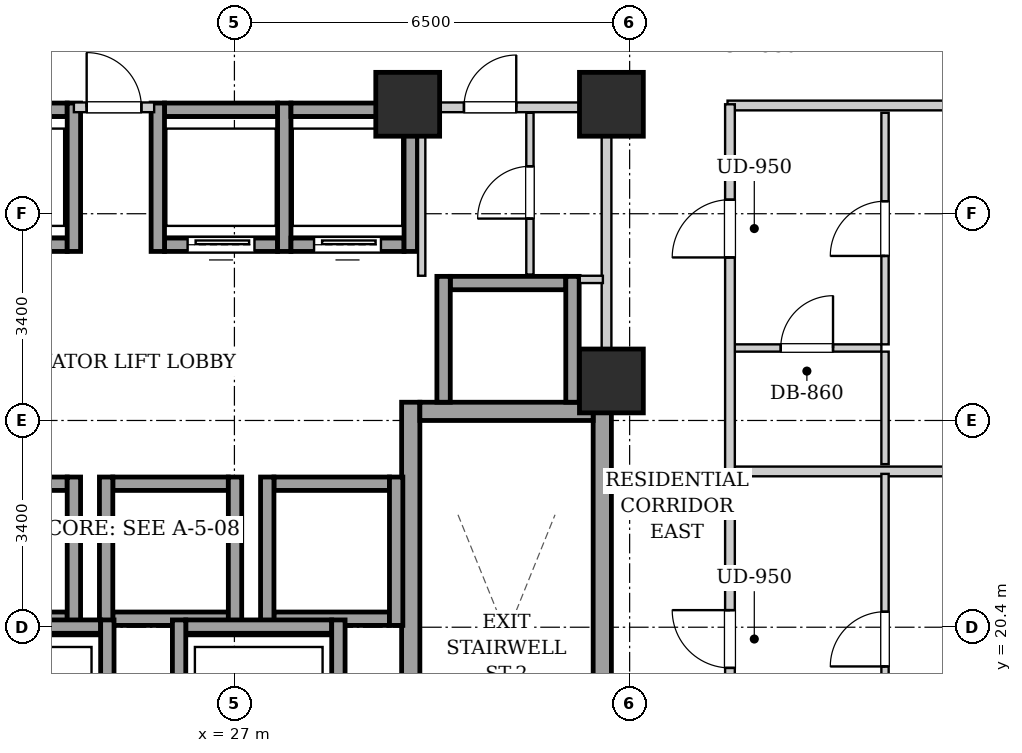
"""IFC4 building model, lengths in metres.
Left out: names, types, materials, properties, quantities, classifications, styles, units other than length and angle.
Written with IfcOpenShell. Run it as: python <this file> out.ifc"""

import sys

from ifc_helpers import new_model, si_unit, direction, frame, frame_2d, origin, origin_2d, place, context, subcontext, project, spatial, rectangle, extrude, element, fill, save


model = new_model("IFC4")
c1 = context("Model", 3, precision=1e-05, world=origin(), true_north=direction((0.0, 1.0)))
c2 = subcontext(c1, "Body", "Model", "MODEL_VIEW")
j1 = project(units=[si_unit("LENGTHUNIT", "METRE"), si_unit("PLANEANGLEUNIT", "RADIAN")], contexts=[c1])
p1 = place(None, origin())
s1 = spatial("IfcSite", under=j1, at=p1, CompositionType="ELEMENT")
p2 = place(p1, origin())
s2 = spatial("IfcBuilding", under=s1, at=p2, CompositionType="ELEMENT")
p3 = place(p2, frame((0.0, 0.0, 113.5)))
s3 = spatial("IfcBuildingStorey", under=s2, at=p3, CompositionType="ELEMENT", Elevation=113.5)
for number, where, z_axis, x_axis in (
    (1, (29.85, 29.0, 0.0), (0.0, 0.0, 1.0), (1.0, 0.0, 0.0)),
    (2, (33.2, 29.0, 0.0), (0.0, 0.0, 1.0), (1.0, 0.0, 0.0)),
    (3, (33.2, 24.45, 0.0), (0.0, 0.0, 1.0), (1.0, 0.0, 0.0)),
):
    element("IfcColumn", number, at=place(p3, frame(where, z_axis=z_axis, x_axis=x_axis)), inside=s3, PredefinedType="COLUMN", context=c2, shape_type="SweptSolid", body=[
        extrude(rectangle(XDim=1.05, YDim=1.05, at=origin_2d()), origin(), (0.0, 0.0, 1.0), 3.2),
    ])
for number, where, z_axis, x_axis in (
    (4, (29.9, 15.1, 0.0), (0.0, 0.0, 1.0), (0.0, 1.0, 0.0)),
    (5, (33.05, 15.1, 0.0), (0.0, 0.0, 1.0), (0.0, 1.0, 0.0)),
):
    element("IfcWall", number, at=place(p3, frame(where, z_axis=z_axis, x_axis=x_axis)), inside=s3, PredefinedType="SHEAR", context=c2, shape_type="SweptSolid", body=[
        extrude(rectangle(XDim=9.0, YDim=0.3, at=frame_2d((4.5, 0.0))), origin(), (0.0, 0.0, 1.0), 2.94),
    ])
p4 = place(p3, frame((30.05, 23.95, 0.0), z_axis=(0.0, 0.0, 1.0), x_axis=(1.0, 0.0, 0.0)))
e6 = element("IfcWall", 6, at=p4, inside=s3, PredefinedType="SHEAR", context=c2, shape_type="SweptSolid", body=[
    extrude(rectangle(XDim=2.85, YDim=0.3, at=frame_2d((1.425, 0.0))), origin(), (0.0, 0.0, 1.0), 2.94),
])
p5 = place(p3, frame((22.35, 26.69, 0.0), z_axis=(0.0, 0.0, 1.0), x_axis=(1.0, 0.0, 0.0)))
e7 = element("IfcWall", 7, at=p5, inside=s3, PredefinedType="SHEAR", context=c2, shape_type="SweptSolid", body=[
    extrude(rectangle(XDim=1.9, YDim=0.22, at=frame_2d((0.95, 0.0))), origin(), (0.0, 0.0, 1.0), 2.94),
])
p6 = place(p5, frame((0.4, 0.0, 0.0)))
e8 = element("IfcOpeningElement", 8, at=p6, cuts=e7, PredefinedType="OPENING", context=c2, shape_type="SweptSolid", body=[
    extrude(rectangle(XDim=1.1, YDim=2.15, at=frame_2d((0.55, 1.075))), frame((0.0, 0.12, 0.0), z_axis=(0.0, -1.0, 0.0), x_axis=(1.0, 0.0, 0.0)), (0.0, 0.0, 1.0), 0.24),
])
p7 = place(p3, frame((22.35, 28.91, 0.0), z_axis=(0.0, 0.0, 1.0), x_axis=(1.0, 0.0, 0.0)))
e9 = element("IfcWall", 9, at=p7, inside=s3, PredefinedType="SHEAR", context=c2, shape_type="SweptSolid", body=[
    extrude(rectangle(XDim=1.9, YDim=0.22, at=frame_2d((0.95, 0.0))), origin(), (0.0, 0.0, 1.0), 2.94),
])
p8 = place(p3, frame((24.36, 26.58, 0.0), z_axis=(0.0, 0.0, 1.0), x_axis=(0.0, 1.0, 0.0)))
e10 = element("IfcWall", 10, at=p8, inside=s3, PredefinedType="SHEAR", context=c2, shape_type="SweptSolid", body=[
    extrude(rectangle(XDim=2.44, YDim=0.22, at=frame_2d((1.22, 0.0))), origin(), (0.0, 0.0, 1.0), 2.94),
])
p9 = place(p3, frame((25.85, 26.69, 0.0), z_axis=(0.0, 0.0, 1.0), x_axis=(1.0, 0.0, 0.0)))
e11 = element("IfcWall", 11, at=p9, inside=s3, PredefinedType="SHEAR", context=c2, shape_type="SweptSolid", body=[
    extrude(rectangle(XDim=1.86, YDim=0.22, at=frame_2d((0.93, 0.0))), origin(), (0.0, 0.0, 1.0), 2.94),
])
p10 = place(p9, frame((0.38, 0.0, 0.0)))
e12 = element("IfcOpeningElement", 12, at=p10, cuts=e11, PredefinedType="OPENING", context=c2, shape_type="SweptSolid", body=[
    extrude(rectangle(XDim=1.1, YDim=2.15, at=frame_2d((0.55, 1.075))), frame((0.0, 0.12, 0.0), z_axis=(0.0, -1.0, 0.0), x_axis=(1.0, 0.0, 0.0)), (0.0, 0.0, 1.0), 0.24),
])
p11 = place(p3, frame((25.85, 28.91, 0.0), z_axis=(0.0, 0.0, 1.0), x_axis=(1.0, 0.0, 0.0)))
e13 = element("IfcWall", 13, at=p11, inside=s3, PredefinedType="SHEAR", context=c2, shape_type="SweptSolid", body=[
    extrude(rectangle(XDim=1.86, YDim=0.22, at=frame_2d((0.93, 0.0))), origin(), (0.0, 0.0, 1.0), 2.94),
])
for number, where, z_axis, x_axis in (
    (14, (25.74, 26.58, 0.0), (0.0, 0.0, 1.0), (0.0, 1.0, 0.0)),
    (15, (27.82, 26.58, 0.0), (0.0, 0.0, 1.0), (0.0, 1.0, 0.0)),
):
    element("IfcWall", number, at=place(p3, frame(where, z_axis=z_axis, x_axis=x_axis)), inside=s3, PredefinedType="SHEAR", context=c2, shape_type="SweptSolid", body=[
        extrude(rectangle(XDim=2.44, YDim=0.22, at=frame_2d((1.22, 0.0))), origin(), (0.0, 0.0, 1.0), 2.94),
    ])
p12 = place(p3, frame((27.93, 26.69, 0.0), z_axis=(0.0, 0.0, 1.0), x_axis=(1.0, 0.0, 0.0)))
e16 = element("IfcWall", 16, at=p12, inside=s3, PredefinedType="SHEAR", context=c2, shape_type="SweptSolid", body=[
    extrude(rectangle(XDim=1.86, YDim=0.22, at=frame_2d((0.93, 0.0))), origin(), (0.0, 0.0, 1.0), 2.94),
])
p13 = place(p12, frame((0.38, 0.0, 0.0)))
e17 = element("IfcOpeningElement", 17, at=p13, cuts=e16, PredefinedType="OPENING", context=c2, shape_type="SweptSolid", body=[
    extrude(rectangle(XDim=1.1, YDim=2.15, at=frame_2d((0.55, 1.075))), frame((0.0, 0.12, 0.0), z_axis=(0.0, -1.0, 0.0), x_axis=(1.0, 0.0, 0.0)), (0.0, 0.0, 1.0), 0.24),
])
p14 = place(p3, frame((27.93, 28.91, 0.0), z_axis=(0.0, 0.0, 1.0), x_axis=(1.0, 0.0, 0.0)))
e18 = element("IfcWall", 18, at=p14, inside=s3, PredefinedType="SHEAR", context=c2, shape_type="SweptSolid", body=[
    extrude(rectangle(XDim=1.86, YDim=0.22, at=frame_2d((0.93, 0.0))), origin(), (0.0, 0.0, 1.0), 2.94),
])
p15 = place(p3, frame((29.9, 26.58, 0.0), z_axis=(0.0, 0.0, 1.0), x_axis=(0.0, 1.0, 0.0)))
e19 = element("IfcWall", 19, at=p15, inside=s3, PredefinedType="SHEAR", context=c2, shape_type="SweptSolid", body=[
    extrude(rectangle(XDim=2.44, YDim=0.22, at=frame_2d((1.22, 0.0))), origin(), (0.0, 0.0, 1.0), 2.94),
])
for number, where, z_axis, x_axis in (
    (20, (22.35, 20.54, 0.0), (0.0, 0.0, 1.0), (1.0, 0.0, 0.0)),
    (21, (22.35, 22.76, 0.0), (0.0, 0.0, 1.0), (1.0, 0.0, 0.0)),
):
    element("IfcWall", number, at=place(p3, frame(where, z_axis=z_axis, x_axis=x_axis)), inside=s3, PredefinedType="SHEAR", context=c2, shape_type="SweptSolid", body=[
        extrude(rectangle(XDim=1.9, YDim=0.22, at=frame_2d((0.95, 0.0))), origin(), (0.0, 0.0, 1.0), 2.94),
    ])
p16 = place(p3, frame((24.36, 20.43, 0.0), z_axis=(0.0, 0.0, 1.0), x_axis=(0.0, 1.0, 0.0)))
e22 = element("IfcWall", 22, at=p16, inside=s3, PredefinedType="SHEAR", context=c2, shape_type="SweptSolid", body=[
    extrude(rectangle(XDim=2.44, YDim=0.22, at=frame_2d((1.22, 0.0))), origin(), (0.0, 0.0, 1.0), 2.94),
])
for number, where, z_axis, x_axis in (
    (23, (25.0, 20.54, 0.0), (0.0, 0.0, 1.0), (1.0, 0.0, 0.0)),
    (24, (25.0, 22.76, 0.0), (0.0, 0.0, 1.0), (1.0, 0.0, 0.0)),
):
    element("IfcWall", number, at=place(p3, frame(where, z_axis=z_axis, x_axis=x_axis)), inside=s3, PredefinedType="SHEAR", context=c2, shape_type="SweptSolid", body=[
        extrude(rectangle(XDim=1.9, YDim=0.22, at=frame_2d((0.95, 0.0))), origin(), (0.0, 0.0, 1.0), 2.94),
    ])
for number, where, z_axis, x_axis in (
    (25, (24.89, 20.43, 0.0), (0.0, 0.0, 1.0), (0.0, 1.0, 0.0)),
    (26, (27.01, 20.43, 0.0), (0.0, 0.0, 1.0), (0.0, 1.0, 0.0)),
):
    element("IfcWall", number, at=place(p3, frame(where, z_axis=z_axis, x_axis=x_axis)), inside=s3, PredefinedType="SHEAR", context=c2, shape_type="SweptSolid", body=[
        extrude(rectangle(XDim=2.44, YDim=0.22, at=frame_2d((1.22, 0.0))), origin(), (0.0, 0.0, 1.0), 2.94),
    ])
for number, where, z_axis, x_axis in (
    (27, (27.65, 20.54, 0.0), (0.0, 0.0, 1.0), (1.0, 0.0, 0.0)),
    (28, (27.65, 22.76, 0.0), (0.0, 0.0, 1.0), (1.0, 0.0, 0.0)),
):
    element("IfcWall", number, at=place(p3, frame(where, z_axis=z_axis, x_axis=x_axis)), inside=s3, PredefinedType="SHEAR", context=c2, shape_type="SweptSolid", body=[
        extrude(rectangle(XDim=1.9, YDim=0.22, at=frame_2d((0.95, 0.0))), origin(), (0.0, 0.0, 1.0), 2.94),
    ])
for number, where, z_axis, x_axis in (
    (29, (27.54, 20.43, 0.0), (0.0, 0.0, 1.0), (0.0, 1.0, 0.0)),
    (30, (29.66, 20.43, 0.0), (0.0, 0.0, 1.0), (0.0, 1.0, 0.0)),
):
    element("IfcWall", number, at=place(p3, frame(where, z_axis=z_axis, x_axis=x_axis)), inside=s3, PredefinedType="SHEAR", context=c2, shape_type="SweptSolid", body=[
        extrude(rectangle(XDim=2.44, YDim=0.22, at=frame_2d((1.22, 0.0))), origin(), (0.0, 0.0, 1.0), 2.94),
    ])
p17 = place(p3, frame((30.55, 26.06, 0.0), z_axis=(0.0, 0.0, 1.0), x_axis=(1.0, 0.0, 0.0)))
e31 = element("IfcWall", 31, at=p17, inside=s3, PredefinedType="SHEAR", context=c2, shape_type="SweptSolid", body=[
    extrude(rectangle(XDim=1.9, YDim=0.22, at=frame_2d((0.95, 0.0))), origin(), (0.0, 0.0, 1.0), 2.94),
])
for number, where, z_axis, x_axis in (
    (32, (30.44, 24.1, 0.0), (0.0, 0.0, 1.0), (0.0, 1.0, 0.0)),
    (33, (32.56, 24.1, 0.0), (0.0, 0.0, 1.0), (0.0, 1.0, 0.0)),
):
    element("IfcWall", number, at=place(p3, frame(where, z_axis=z_axis, x_axis=x_axis)), inside=s3, PredefinedType="SHEAR", context=c2, shape_type="SweptSolid", body=[
        extrude(rectangle(XDim=2.07, YDim=0.22, at=frame_2d((1.035, 0.0))), origin(), (0.0, 0.0, 1.0), 2.94),
    ])
p18 = place(p3, frame((22.4, 20.41, 0.0), z_axis=(0.0, 0.0, 1.0), x_axis=(1.0, 0.0, 0.0)))
e34 = element("IfcWall", 34, at=p18, inside=s3, PredefinedType="SHEAR", context=c2, shape_type="SweptSolid", body=[
    extrude(rectangle(XDim=2.4, YDim=0.22, at=frame_2d((1.2, 0.0))), origin(), (0.0, 0.0, 1.0), 2.94),
])
p19 = place(p3, frame((24.91, 17.98, 0.0), z_axis=(0.0, 0.0, 1.0), x_axis=(0.0, 1.0, 0.0)))
e35 = element("IfcWall", 35, at=p19, inside=s3, PredefinedType="SHEAR", context=c2, shape_type="SweptSolid", body=[
    extrude(rectangle(XDim=2.54, YDim=0.22, at=frame_2d((1.27, 0.0))), origin(), (0.0, 0.0, 1.0), 2.94),
])
p20 = place(p3, frame((26.2, 20.41, 0.0), z_axis=(0.0, 0.0, 1.0), x_axis=(1.0, 0.0, 0.0)))
e36 = element("IfcWall", 36, at=p20, inside=s3, PredefinedType="SHEAR", context=c2, shape_type="SweptSolid", body=[
    extrude(rectangle(XDim=2.4, YDim=0.22, at=frame_2d((1.2, 0.0))), origin(), (0.0, 0.0, 1.0), 2.94),
])
for number, where, z_axis, x_axis in (
    (37, (26.09, 17.98, 0.0), (0.0, 0.0, 1.0), (0.0, 1.0, 0.0)),
    (38, (28.71, 17.98, 0.0), (0.0, 0.0, 1.0), (0.0, 1.0, 0.0)),
):
    element("IfcWall", number, at=place(p3, frame(where, z_axis=z_axis, x_axis=x_axis)), inside=s3, PredefinedType="SHEAR", context=c2, shape_type="SweptSolid", body=[
        extrude(rectangle(XDim=2.54, YDim=0.22, at=frame_2d((1.27, 0.0))), origin(), (0.0, 0.0, 1.0), 2.94),
    ])
p21 = place(p3, frame((33.12, 24.12, 0.0), z_axis=(0.0, 0.0, 1.0), x_axis=(0.0, 1.0, 0.0)))
e39 = element("IfcWall", 39, at=p21, inside=s3, PredefinedType="PARTITIONING", context=c2, shape_type="SweptSolid", body=[
    extrude(rectangle(XDim=4.76, YDim=0.16, at=frame_2d((2.38, 0.0))), origin(), (0.0, 0.0, 1.0), 2.94),
])
p22 = place(p3, frame((24.36, 28.95, 0.0), z_axis=(0.0, 0.0, 1.0), x_axis=(1.0, 0.0, 0.0)))
e40 = element("IfcWall", 40, at=p22, inside=s3, PredefinedType="PARTITIONING", context=c2, shape_type="SweptSolid", body=[
    extrude(rectangle(XDim=1.32, YDim=0.16, at=frame_2d((0.66, 0.0))), origin(), (0.0, 0.0, 1.0), 2.313),
])
p23 = place(p22, frame((0.21, 0.0, 0.0)))
e41 = element("IfcOpeningElement", 41, at=p23, cuts=e40, PredefinedType="OPENING", context=c2, shape_type="SweptSolid", body=[
    extrude(rectangle(XDim=0.9, YDim=2.05, at=frame_2d((0.45, 1.025))), frame((0.0, 0.09, 0.0), z_axis=(0.0, -1.0, 0.0), x_axis=(1.0, 0.0, 0.0)), (0.0, 0.0, 1.0), 0.18),
])
p24 = place(p3, frame((30.08, 26.18, 0.0), z_axis=(0.0, 0.0, 1.0), x_axis=(0.0, 1.0, 0.0)))
e42 = element("IfcWall", 42, at=p24, inside=s3, PredefinedType="PARTITIONING", context=c2, shape_type="SweptSolid", body=[
    extrude(rectangle(XDim=2.68, YDim=0.12, at=frame_2d((1.34, 0.0))), origin(), (0.0, 0.0, 1.0), 2.94),
])
p25 = place(p3, frame((32.68, 26.12, 0.0), z_axis=(0.0, 0.0, 1.0), x_axis=(1.0, 0.0, 0.0)))
e43 = element("IfcWall", 43, at=p25, inside=s3, PredefinedType="PARTITIONING", context=c2, shape_type="SweptSolid", body=[
    extrude(rectangle(XDim=0.38, YDim=0.12, at=frame_2d((0.19, 0.0))), origin(), (0.0, 0.0, 1.0), 2.94),
])
p26 = place(p3, frame((31.86, 26.2, 0.0), z_axis=(0.0, 0.0, 1.0), x_axis=(0.0, 1.0, 0.0)))
e44 = element("IfcWall", 44, at=p26, inside=s3, PredefinedType="PARTITIONING", context=c2, shape_type="SweptSolid", body=[
    extrude(rectangle(XDim=2.66, YDim=0.12, at=frame_2d((1.33, 0.0))), origin(), (0.0, 0.0, 1.0), 2.94),
])
p27 = place(p26, frame((0.92, 0.0, 0.0)))
e45 = element("IfcOpeningElement", 45, at=p27, cuts=e44, PredefinedType="OPENING", context=c2, shape_type="SweptSolid", body=[
    extrude(rectangle(XDim=0.86, YDim=2.05, at=frame_2d((0.43, 1.025))), frame((0.0, 0.07, 0.0), z_axis=(0.0, -1.0, 0.0), x_axis=(1.0, 0.0, 0.0)), (0.0, 0.0, 1.0), 0.14),
])
p28 = place(p3, frame((30.08, 28.95, 0.0), z_axis=(0.0, 0.0, 1.0), x_axis=(1.0, 0.0, 0.0)))
e46 = element("IfcWall", 46, at=p28, inside=s3, PredefinedType="PARTITIONING", context=c2, shape_type="SweptSolid", body=[
    extrude(rectangle(XDim=2.96, YDim=0.16, at=frame_2d((1.48, 0.0))), origin(), (0.0, 0.0, 1.0), 2.94),
])
p29 = place(p28, frame((0.695, 0.0, 0.0)))
e47 = element("IfcOpeningElement", 47, at=p29, cuts=e46, PredefinedType="OPENING", context=c2, shape_type="SweptSolid", body=[
    extrude(rectangle(XDim=0.86, YDim=2.05, at=frame_2d((0.43, 1.025))), frame((0.0, 0.09, 0.0), z_axis=(0.0, -1.0, 0.0), x_axis=(1.0, 0.0, 0.0)), (0.0, 0.0, 1.0), 0.18),
])
p30 = place(p3, frame((35.11, 28.98, 0.0), z_axis=(0.0, 0.0, 1.0), x_axis=(1.0, 0.0, 0.0)))
e48 = element("IfcWall", 48, at=p30, inside=s3, PredefinedType="PARTITIONING", context=c2, shape_type="SweptSolid", body=[
    extrude(rectangle(XDim=8.01, YDim=0.16, at=frame_2d((4.005, 0.0))), origin(), (0.0, 0.0, 1.0), 2.313),
])
p31 = place(p3, frame((35.19, 22.962, 0.0), z_axis=(0.0, 0.0, 1.0), x_axis=(1.0, 0.0, 0.0)))
e49 = element("IfcWall", 49, at=p31, inside=s3, PredefinedType="PARTITIONING", context=c2, shape_type="SweptSolid", body=[
    extrude(rectangle(XDim=7.93, YDim=0.16, at=frame_2d((3.965, 0.0))), origin(), (0.0, 0.0, 1.0), 2.94),
])
p32 = place(p3, frame((37.7, 17.489, 0.0), z_axis=(0.0, 0.0, 1.0), x_axis=(0.0, 1.0, 0.0)))
e50 = element("IfcWall", 50, at=p32, inside=s3, PredefinedType="PARTITIONING", context=c2, shape_type="SweptSolid", body=[
    extrude(rectangle(XDim=5.433, YDim=0.12, at=frame_2d((2.717, 0.0))), origin(), (0.0, 0.0, 1.0), 2.94),
])
p33 = place(p32, frame((2.266, 0.0, 0.0)))
e51 = element("IfcOpeningElement", 51, at=p33, cuts=e50, PredefinedType="OPENING", context=c2, shape_type="SweptSolid", body=[
    extrude(rectangle(XDim=0.9, YDim=2.05, at=frame_2d((0.45, 1.025))), frame((0.0, 0.07, 0.0), z_axis=(0.0, -1.0, 0.0), x_axis=(1.0, 0.0, 0.0)), (0.0, 0.0, 1.0), 0.14),
])
p34 = place(p3, frame((35.19, 24.992, 0.0), z_axis=(0.0, 0.0, 1.0), x_axis=(1.0, 0.0, 0.0)))
e52 = element("IfcWall", 52, at=p34, inside=s3, PredefinedType="PARTITIONING", context=c2, shape_type="SweptSolid", body=[
    extrude(rectangle(XDim=2.45, YDim=0.12, at=frame_2d((1.225, 0.0))), origin(), (0.0, 0.0, 1.0), 2.94),
])
p35 = place(p34, frame((0.795, 0.0, 0.0)))
e53 = element("IfcOpeningElement", 53, at=p35, cuts=e52, PredefinedType="OPENING", context=c2, shape_type="SweptSolid", body=[
    extrude(rectangle(XDim=0.86, YDim=2.05, at=frame_2d((0.43, 1.025))), frame((0.0, 0.07, 0.0), z_axis=(0.0, -1.0, 0.0), x_axis=(1.0, 0.0, 0.0)), (0.0, 0.0, 1.0), 0.14),
])
p36 = place(p3, frame((37.7, 23.082, 0.0), z_axis=(0.0, 0.0, 1.0), x_axis=(0.0, 1.0, 0.0)))
e54 = element("IfcWall", 54, at=p36, inside=s3, PredefinedType="PARTITIONING", context=c2, shape_type="SweptSolid", body=[
    extrude(rectangle(XDim=1.85, YDim=0.12, at=frame_2d((0.925, 0.0))), origin(), (0.0, 0.0, 1.0), 2.94),
])
p37 = place(p3, frame((37.7, 25.052, 0.0), z_axis=(0.0, 0.0, 1.0), x_axis=(0.0, 1.0, 0.0)))
e55 = element("IfcWall", 55, at=p37, inside=s3, PredefinedType="PARTITIONING", context=c2, shape_type="SweptSolid", body=[
    extrude(rectangle(XDim=3.808, YDim=0.12, at=frame_2d((1.904, 0.0))), origin(), (0.0, 0.0, 1.0), 2.94),
])
p38 = place(p37, frame((1.454, 0.0, 0.0)))
e56 = element("IfcOpeningElement", 56, at=p38, cuts=e55, PredefinedType="OPENING", context=c2, shape_type="SweptSolid", body=[
    extrude(rectangle(XDim=0.9, YDim=2.05, at=frame_2d((0.45, 1.025))), frame((0.0, 0.07, 0.0), z_axis=(0.0, -1.0, 0.0), x_axis=(1.0, 0.0, 0.0)), (0.0, 0.0, 1.0), 0.14),
])
p39 = place(p3, frame((35.15, 15.07, 0.0), z_axis=(0.0, 0.0, 1.0), x_axis=(0.0, 1.0, 0.0)))
e57 = element("IfcWall", 57, at=p39, inside=s3, PredefinedType="PARTITIONING", context=c2, shape_type="SweptSolid", body=[
    extrude(rectangle(XDim=13.93, YDim=0.16, at=frame_2d((6.965, 0.0))), origin(), (0.0, 0.0, 1.0), 2.94),
])
p40 = place(p39, frame((4.661, 0.0, 0.0)))
e58 = element("IfcOpeningElement", 58, at=p40, cuts=e57, PredefinedType="OPENING", context=c2, shape_type="SweptSolid", body=[
    extrude(rectangle(XDim=0.95, YDim=2.1, at=frame_2d((0.475, 1.05))), frame((0.0, 0.09, 0.0), z_axis=(0.0, -1.0, 0.0), x_axis=(1.0, 0.0, 0.0)), (0.0, 0.0, 1.0), 0.18),
])
p41 = place(p39, frame((11.411, 0.0, 0.0)))
e59 = element("IfcOpeningElement", 59, at=p41, cuts=e57, PredefinedType="OPENING", context=c2, shape_type="SweptSolid", body=[
    extrude(rectangle(XDim=0.95, YDim=2.1, at=frame_2d((0.475, 1.05))), frame((0.0, 0.09, 0.0), z_axis=(0.0, -1.0, 0.0), x_axis=(1.0, 0.0, 0.0)), (0.0, 0.0, 1.0), 0.18),
])
p42 = place(p10, origin())
e60 = element("IfcDoor", 60, at=p42, inside=s3, OperationType="SLIDING_TO_LEFT", PredefinedType="DOOR", context=c2, shape_type="SweptSolid", body=[
    extrude(rectangle(XDim=1.1, YDim=2.15, at=frame_2d((0.55, 1.075))), frame((0.0, 0.025, 0.0), z_axis=(0.0, -1.0, 0.0), x_axis=(1.0, 0.0, 0.0)), (0.0, 0.0, 1.0), 0.05),
])
fill(e12, e60)
p43 = place(p13, origin())
e61 = element("IfcDoor", 61, at=p43, inside=s3, OperationType="SLIDING_TO_LEFT", PredefinedType="DOOR", context=c2, shape_type="SweptSolid", body=[
    extrude(rectangle(XDim=1.1, YDim=2.15, at=frame_2d((0.55, 1.075))), frame((0.0, 0.025, 0.0), z_axis=(0.0, -1.0, 0.0), x_axis=(1.0, 0.0, 0.0)), (0.0, 0.0, 1.0), 0.05),
])
fill(e17, e61)
p44 = place(p23, origin())
e62 = element("IfcDoor", 62, at=p44, inside=s3, OperationType="SINGLE_SWING_LEFT", PredefinedType="DOOR", context=c2, shape_type="SweptSolid", body=[
    extrude(rectangle(XDim=0.9, YDim=2.05, at=frame_2d((0.45, 1.025))), frame((0.0, 0.025, 0.0), z_axis=(0.0, -1.0, 0.0), x_axis=(1.0, 0.0, 0.0)), (0.0, 0.0, 1.0), 0.05),
])
fill(e41, e62)
p45 = place(p27, origin())
e63 = element("IfcDoor", 63, at=p45, inside=s3, OperationType="SINGLE_SWING_LEFT", PredefinedType="DOOR", context=c2, shape_type="SweptSolid", body=[
    extrude(rectangle(XDim=0.86, YDim=2.05, at=frame_2d((0.43, 1.025))), frame((0.0, 0.025, 0.0), z_axis=(0.0, -1.0, 0.0), x_axis=(1.0, 0.0, 0.0)), (0.0, 0.0, 1.0), 0.05),
])
fill(e45, e63)
p46 = place(p29, origin())
e64 = element("IfcDoor", 64, at=p46, inside=s3, OperationType="SINGLE_SWING_RIGHT", PredefinedType="DOOR", context=c2, shape_type="SweptSolid", body=[
    extrude(rectangle(XDim=0.86, YDim=2.05, at=frame_2d((0.43, 1.025))), frame((0.0, 0.025, 0.0), z_axis=(0.0, -1.0, 0.0), x_axis=(1.0, 0.0, 0.0)), (0.0, 0.0, 1.0), 0.05),
])
fill(e47, e64)
p47 = place(p33, origin())
e65 = element("IfcDoor", 65, at=p47, inside=s3, OperationType="SINGLE_SWING_LEFT", PredefinedType="DOOR", context=c2, shape_type="SweptSolid", body=[
    extrude(rectangle(XDim=0.9, YDim=2.05, at=frame_2d((0.45, 1.025))), frame((0.0, 0.025, 0.0), z_axis=(0.0, -1.0, 0.0), x_axis=(1.0, 0.0, 0.0)), (0.0, 0.0, 1.0), 0.05),
])
fill(e51, e65)
p48 = place(p35, origin())
e66 = element("IfcDoor", 66, at=p48, inside=s3, OperationType="SINGLE_SWING_RIGHT", PredefinedType="DOOR", context=c2, shape_type="SweptSolid", body=[
    extrude(rectangle(XDim=0.86, YDim=2.05, at=frame_2d((0.43, 1.025))), frame((0.0, 0.025, 0.0), z_axis=(0.0, -1.0, 0.0), x_axis=(1.0, 0.0, 0.0)), (0.0, 0.0, 1.0), 0.05),
])
fill(e53, e66)
p49 = place(p38, origin())
e67 = element("IfcDoor", 67, at=p49, inside=s3, OperationType="SINGLE_SWING_LEFT", PredefinedType="DOOR", context=c2, shape_type="SweptSolid", body=[
    extrude(rectangle(XDim=0.9, YDim=2.05, at=frame_2d((0.45, 1.025))), frame((0.0, 0.025, 0.0), z_axis=(0.0, -1.0, 0.0), x_axis=(1.0, 0.0, 0.0)), (0.0, 0.0, 1.0), 0.05),
])
fill(e56, e67)
p50 = place(p40, origin())
e68 = element("IfcDoor", 68, at=p50, inside=s3, OperationType="SINGLE_SWING_RIGHT", PredefinedType="DOOR", context=c2, shape_type="SweptSolid", body=[
    extrude(rectangle(XDim=0.95, YDim=2.1, at=frame_2d((0.475, 1.05))), frame((0.0, 0.025, 0.0), z_axis=(0.0, -1.0, 0.0), x_axis=(1.0, 0.0, 0.0)), (0.0, 0.0, 1.0), 0.05),
])
fill(e58, e68)
p51 = place(p41, origin())
e69 = element("IfcDoor", 69, at=p51, inside=s3, OperationType="SINGLE_SWING_LEFT", PredefinedType="DOOR", context=c2, shape_type="SweptSolid", body=[
    extrude(rectangle(XDim=0.95, YDim=2.1, at=frame_2d((0.475, 1.05))), frame((0.0, 0.025, 0.0), z_axis=(0.0, -1.0, 0.0), x_axis=(1.0, 0.0, 0.0)), (0.0, 0.0, 1.0), 0.05),
])
fill(e59, e69)
save(model, sys.argv[1])
